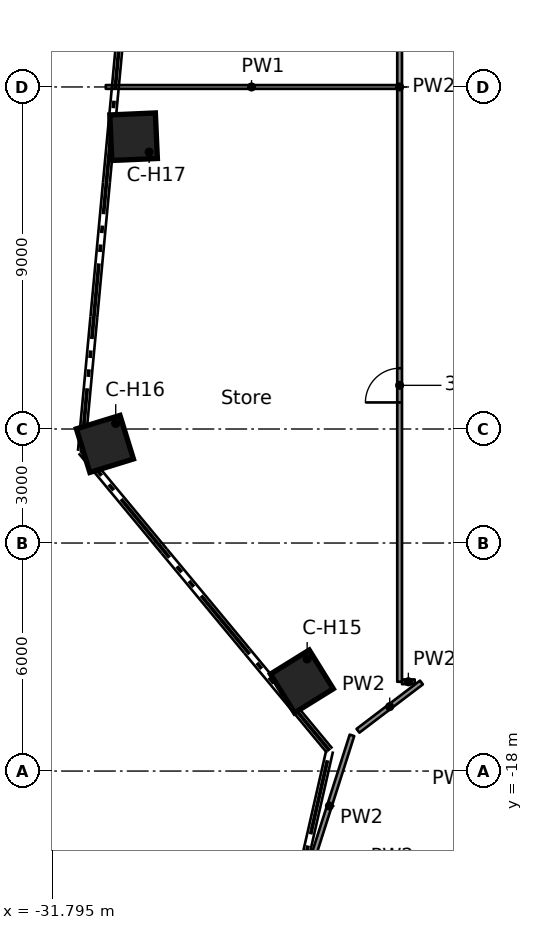
"""IFC4 building model, lengths in metres.
Left out: names, types, materials, properties, quantities, classifications, styles, units other than length and angle.
Written with IfcOpenShell. Run it as: python <this file> out.ifc"""

import sys

from ifc_helpers import new_model, si_unit, direction, frame, frame_2d, origin, origin_2d, place, context, subcontext, project, spatial, rectangle, extrude, element, fill, save


model = new_model("IFC4")
c1 = context("Model", 3, precision=1e-05, world=origin(), true_north=direction((0.0, 1.0)))
c2 = subcontext(c1, "Body", "Model", "MODEL_VIEW")
j1 = project(units=[si_unit("LENGTHUNIT", "METRE"), si_unit("PLANEANGLEUNIT", "RADIAN")], contexts=[c1])
p1 = place(None, origin())
s1 = spatial("IfcSite", under=j1, at=p1, CompositionType="ELEMENT")
p2 = place(p1, origin())
s2 = spatial("IfcBuilding", under=s1, at=p2, CompositionType="ELEMENT")
p3 = place(p2, frame((0.0, 0.0, 181.1)))
s3 = spatial("IfcBuildingStorey", under=s2, at=p3, CompositionType="ELEMENT", Elevation=181.1)
for number, where, z_axis, x_axis in (
    (1, (-25.222, -15.642, 0.0), (0.0, 0.0, 1.0), (-0.85, -0.527, 0.0)),
    (2, (-30.405, -9.392, 0.0), (0.0, 0.0, 1.0), (-0.955, -0.295, 0.0)),
    (3, (-29.65, -1.309, 0.0), (0.0, 0.0, 1.0), (-0.999, -0.044, 0.0)),
):
    element("IfcColumn", number, at=place(p3, frame(where, z_axis=z_axis, x_axis=x_axis)), inside=s3, PredefinedType="COLUMN", context=c2, shape_type="SweptSolid", body=[
        extrude(rectangle(XDim=1.2, YDim=1.2, at=origin_2d()), origin(), (0.0, 0.0, 1.0), 3.5),
    ])
p4 = place(p3, frame((-22.587, -15.651, 0.0), z_axis=(0.0, 0.0, 1.0), x_axis=(1.0, 0.0, 0.0)))
e4 = element("IfcWall", 4, at=p4, inside=s3, PredefinedType="PARTITIONING", context=c2, shape_type="SweptSolid", body=[
    extrude(rectangle(XDim=0.334, YDim=0.125, at=frame_2d((0.167, 0.0))), origin(), (0.0, 0.0, 1.0), 3.06),
])
p5 = place(p3, frame((-30.382, 0.0, 0.0), z_axis=(0.0, 0.0, 1.0), x_axis=(1.0, 0.0, 0.0)))
e5 = element("IfcWall", 5, at=p5, inside=s3, PredefinedType="PARTITIONING", context=c2, shape_type="SweptSolid", body=[
    extrude(rectangle(XDim=7.67, YDim=0.1, at=frame_2d((3.835, 0.0))), origin(), (0.0, 0.0, 1.0), 3.06),
])
p6 = place(p3, frame((-23.746, -16.94, 0.0), z_axis=(0.0, 0.0, 1.0), x_axis=(0.796002971308, 0.605292714039, 0.0)))
e6 = element("IfcWall", 6, at=p6, inside=s3, PredefinedType="PARTITIONING", context=c2, shape_type="SweptSolid", body=[
    extrude(rectangle(XDim=2.098, YDim=0.125, at=frame_2d((1.049, 0.0))), origin(), (0.0, 0.0, 1.0), 3.06),
])
p7 = place(p3, frame((-19.467, -15.656, 0.0), z_axis=(0.0, 0.0, 1.0), x_axis=(-0.304004951976, -0.952670451507, 0.0)))
e7 = element("IfcWall", 7, at=p7, inside=s3, PredefinedType="PARTITIONING", context=c2, shape_type="SweptSolid", body=[
    extrude(rectangle(XDim=6.023, YDim=0.125, at=frame_2d((3.012, 0.0))), origin(), (0.0, 0.0, 1.0), 3.06),
])
p8 = place(p7, frame((4.113, 0.0, 0.0)))
e8 = element("IfcOpeningElement", 8, at=p8, cuts=e7, PredefinedType="OPENING", context=c2, shape_type="SweptSolid", body=[
    extrude(rectangle(XDim=0.9, YDim=2.1, at=frame_2d((0.45, 1.05))), frame((0.0, 0.073, 0.0), z_axis=(0.0, -1.0, 0.0), x_axis=(1.0, 0.0, 0.0)), (0.0, 0.0, 1.0), 0.145),
])
p9 = place(p3, frame((-23.904, -17.06, 0.0), z_axis=(0.0, 0.0, 1.0), x_axis=(-0.304208106658, -0.952605599314, 0.0)))
e9 = element("IfcWall", 9, at=p9, inside=s3, PredefinedType="PARTITIONING", context=c2, shape_type="SweptSolid", body=[
    extrude(rectangle(XDim=3.902, YDim=0.125, at=frame_2d((1.951, 0.0))), origin(), (0.0, 0.0, 1.0), 3.06),
])
p10 = place(p3, frame((-22.65, -15.651, 0.0), z_axis=(0.0, 0.0, 1.0), x_axis=(0.0, 1.0, 0.0)))
e10 = element("IfcWall", 10, at=p10, inside=s3, PredefinedType="PARTITIONING", context=c2, shape_type="SweptSolid", body=[
    extrude(rectangle(XDim=31.302, YDim=0.125, at=frame_2d((15.651, 0.0))), origin(), (0.0, 0.0, 1.0), 3.06),
])
p11 = place(p10, frame((7.35, 0.0, 0.0)))
e11 = element("IfcOpeningElement", 11, at=p11, cuts=e10, PredefinedType="OPENING", context=c2, shape_type="SweptSolid", body=[
    extrude(rectangle(XDim=0.9, YDim=2.1, at=frame_2d((0.45, 1.05))), frame((0.0, 0.073, 0.0), z_axis=(0.0, -1.0, 0.0), x_axis=(1.0, 0.0, 0.0)), (0.0, 0.0, 1.0), 0.145),
])
p12 = place(p10, frame((22.501, 0.0, 0.0)))
e12 = element("IfcOpeningElement", 12, at=p12, cuts=e10, PredefinedType="OPENING", context=c2, shape_type="SweptSolid", body=[
    extrude(rectangle(XDim=1.8, YDim=2.1, at=frame_2d((0.9, 1.05))), frame((0.0, 0.073, 0.0), z_axis=(0.0, -1.0, 0.0), x_axis=(1.0, 0.0, 0.0)), (0.0, 0.0, 1.0), 0.145),
])
p13 = place(p11, origin())
e13 = element("IfcDoor", 13, at=p13, inside=s3, OperationType="SINGLE_SWING_LEFT", PredefinedType="DOOR", context=c2, shape_type="SweptSolid", body=[
    extrude(rectangle(XDim=0.9, YDim=2.1, at=frame_2d((0.45, 1.05))), frame((0.0, 0.025, 0.0), z_axis=(0.0, -1.0, 0.0), x_axis=(1.0, 0.0, 0.0)), (0.0, 0.0, 1.0), 0.05),
])
fill(e11, e13)
save(model, sys.argv[1])
